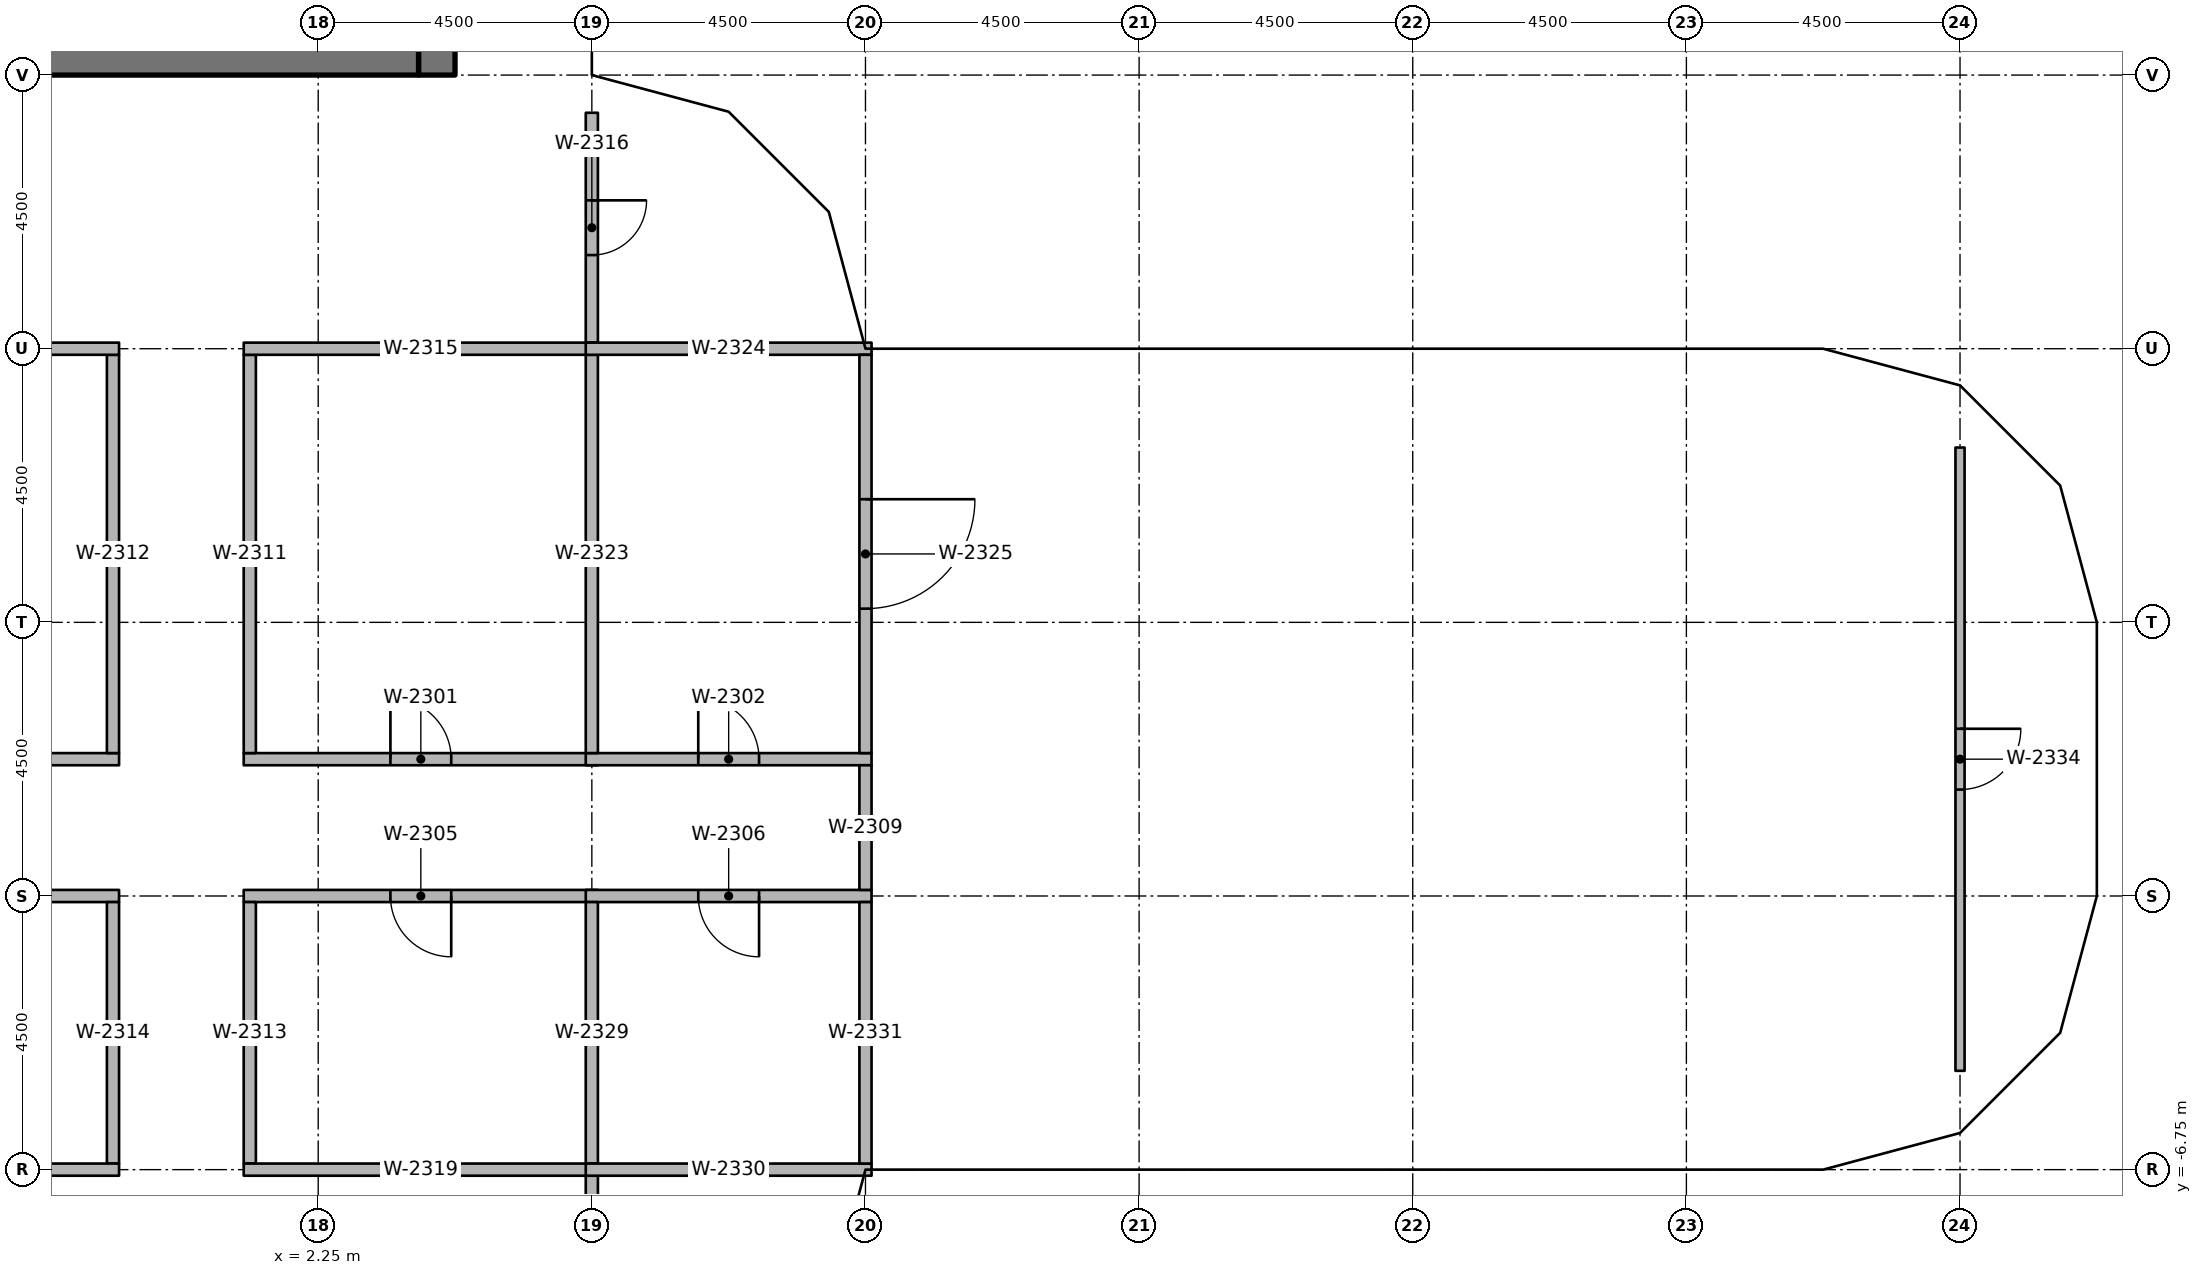
"""IFC4 building model, lengths in metres.
Left out: names, types, materials, properties, quantities, classifications, styles, units other than length and angle.
Written with IfcOpenShell. Run it as: python <this file> out.ifc"""

import sys

from ifc_helpers import new_model, si_unit, direction, frame, frame_2d, origin, origin_2d, place, context, subcontext, project, spatial, rectangle, extrude, element, fill, save


model = new_model("IFC4")
c1 = context("Model", 3, precision=1e-05, world=origin(), true_north=direction((0.0, 1.0)))
c2 = subcontext(c1, "Body", "Model", "MODEL_VIEW")
j1 = project(units=[si_unit("LENGTHUNIT", "METRE"), si_unit("PLANEANGLEUNIT", "RADIAN")], contexts=[c1])
p1 = place(None, origin())
s1 = spatial("IfcSite", under=j1, at=p1, CompositionType="ELEMENT")
p2 = place(p1, origin())
s2 = spatial("IfcBuilding", under=s1, at=p2, CompositionType="ELEMENT")
p3 = place(p2, frame((0.0, 0.0, 218.2)))
s3 = spatial("IfcBuildingStorey", under=s2, at=p3, CompositionType="ELEMENT", Elevation=218.2)
for number, where, z_axis, x_axis in (
    (1, (6.25, -6.25, 0.0), (0.0, 0.0, 1.0), (1.0, 0.0, 0.0)),
    (2, (6.25, 6.25, 0.0), (0.0, 0.0, 1.0), (1.0, 0.0, 0.0)),
    (3, (6.25, 10.75, 0.0), (0.0, 0.0, 1.0), (1.0, 0.0, 0.0)),
    (4, (10.75, -6.25, 0.0), (0.0, 0.0, 1.0), (1.0, 0.0, 0.0)),
    (5, (10.75, 6.25, 0.0), (0.0, 0.0, 1.0), (1.0, 0.0, 0.0)),
    (6, (15.75, -6.25, 0.0), (0.0, 0.0, 1.0), (1.0, 0.0, 0.0)),
    (7, (15.75, 6.25, 0.0), (0.0, 0.0, 1.0), (1.0, 0.0, 0.0)),
    (8, (20.25, -6.11, 0.0), (0.0, 0.0, 1.0), (1.0, 0.0, 0.0)),
    (9, (20.25, 6.11, 0.0), (0.0, 0.0, 1.0), (1.0, 0.0, 0.0)),
    (10, (24.75, -6.11, 0.0), (0.0, 0.0, 1.0), (1.0, 0.0, 0.0)),
    (11, (24.75, 6.11, 0.0), (0.0, 0.0, 1.0), (1.0, 0.0, 0.0)),
    (12, (28.908, -5.475, 0.0), (0.0, 0.0, 1.0), (1.0, 0.0, 0.0)),
    (13, (28.67, -2.25, 0.0), (0.0, 0.0, 1.0), (1.0, 0.0, 0.0)),
    (14, (28.67, 2.25, 0.0), (0.0, 0.0, 1.0), (1.0, 0.0, 0.0)),
    (15, (28.908, 5.475, 0.0), (0.0, 0.0, 1.0), (1.0, 0.0, 0.0)),
):
    element("IfcColumn", number, at=place(p3, frame(where, z_axis=z_axis, x_axis=x_axis)), inside=s3, PredefinedType="COLUMN", context=c2, shape_type="SweptSolid", body=[
        extrude(rectangle(XDim=0.7, YDim=0.7, at=origin_2d()), origin(), (0.0, 0.0, 1.0), 3.65),
    ])
p4 = place(p3, frame((4.2, 11.25, 0.0), z_axis=(0.0, 0.0, 1.0), x_axis=(0.0, 1.0, 0.0)))
e16 = element("IfcWall", 16, at=p4, inside=s3, PredefinedType="SHEAR", context=c2, shape_type="SweptSolid", body=[
    extrude(rectangle(XDim=15.0, YDim=0.6, at=frame_2d((7.5, 0.0))), origin(), (0.0, 0.0, 1.0), 3.8),
])
p5 = place(p4, frame((7.15, 0.0, 0.0)))
e17 = element("IfcOpeningElement", 17, at=p5, cuts=e16, PredefinedType="OPENING", context=c2, shape_type="SweptSolid", body=[
    extrude(rectangle(XDim=1.5, YDim=2.3, at=frame_2d((0.75, 1.15))), frame((0.0, 0.31, 0.0), z_axis=(0.0, -1.0, 0.0), x_axis=(1.0, 0.0, 0.0)), (0.0, 0.0, 1.0), 0.62),
])
p6 = place(p4, frame((5.55, 0.0, 0.0)))
e18 = element("IfcOpeningElement", 18, at=p6, cuts=e16, PredefinedType="OPENING", context=c2, shape_type="SweptSolid", body=[
    extrude(rectangle(XDim=1.2, YDim=2.1, at=frame_2d((0.6, 1.05))), frame((0.0, 0.31, 0.0), z_axis=(0.0, -1.0, 0.0), x_axis=(1.0, 0.0, 0.0)), (0.0, 0.0, 1.0), 0.62),
])
p7 = place(p3, frame((-3.9, 11.55, 0.0), z_axis=(0.0, 0.0, 1.0), x_axis=(1.0, 0.0, 0.0)))
e19 = element("IfcWall", 19, at=p7, inside=s3, PredefinedType="SHEAR", context=c2, shape_type="SweptSolid", body=[
    extrude(rectangle(XDim=7.8, YDim=0.6, at=frame_2d((3.9, 0.0))), origin(), (0.0, 0.0, 1.0), 3.8),
])
p8 = place(p3, frame((1.025, 0.0, 0.0), z_axis=(0.0, 0.0, 1.0), x_axis=(1.0, 0.0, 0.0)))
e20 = element("IfcWall", 20, at=p8, inside=s3, PredefinedType="PARTITIONING", context=c2, shape_type="SweptSolid", body=[
    extrude(rectangle(XDim=5.825, YDim=0.2, at=frame_2d((2.913, 0.0))), origin(), (0.0, 0.0, 1.0), 2.75),
])
p9 = place(p8, frame((2.413, 0.0, 0.0)))
e21 = element("IfcOpeningElement", 21, at=p9, cuts=e20, PredefinedType="OPENING", context=c2, shape_type="SweptSolid", body=[
    extrude(rectangle(XDim=1.0, YDim=2.1, at=frame_2d((0.5, 1.05))), frame((0.0, 0.11, 0.0), z_axis=(0.0, -1.0, 0.0), x_axis=(1.0, 0.0, 0.0)), (0.0, 0.0, 1.0), 0.22),
])
p10 = place(p3, frame((6.65, 0.0, 0.0), z_axis=(0.0, 0.0, 1.0), x_axis=(1.0, 0.0, 0.0)))
e22 = element("IfcWall", 22, at=p10, inside=s3, PredefinedType="PARTITIONING", context=c2, shape_type="SweptSolid", body=[
    extrude(rectangle(XDim=4.7, YDim=0.2, at=frame_2d((2.35, 0.0))), origin(), (0.0, 0.0, 1.0), 2.75),
])
p11 = place(p10, frame((1.85, 0.0, 0.0)))
e23 = element("IfcOpeningElement", 23, at=p11, cuts=e22, PredefinedType="OPENING", context=c2, shape_type="SweptSolid", body=[
    extrude(rectangle(XDim=1.0, YDim=2.1, at=frame_2d((0.5, 1.05))), frame((0.0, 0.11, 0.0), z_axis=(0.0, -1.0, 0.0), x_axis=(1.0, 0.0, 0.0)), (0.0, 0.0, 1.0), 0.22),
])
p12 = place(p3, frame((-6.85, 0.0, 0.0), z_axis=(0.0, 0.0, 1.0), x_axis=(1.0, 0.0, 0.0)))
e24 = element("IfcWall", 24, at=p12, inside=s3, PredefinedType="PARTITIONING", context=c2, shape_type="SweptSolid", body=[
    extrude(rectangle(XDim=5.825, YDim=0.2, at=frame_2d((2.913, 0.0))), origin(), (0.0, 0.0, 1.0), 2.75),
])
p13 = place(p12, frame((2.413, 0.0, 0.0)))
e25 = element("IfcOpeningElement", 25, at=p13, cuts=e24, PredefinedType="OPENING", context=c2, shape_type="SweptSolid", body=[
    extrude(rectangle(XDim=1.0, YDim=2.1, at=frame_2d((0.5, 1.05))), frame((0.0, 0.11, 0.0), z_axis=(0.0, -1.0, 0.0), x_axis=(1.0, 0.0, 0.0)), (0.0, 0.0, 1.0), 0.22),
])
p14 = place(p3, frame((6.85, -2.25, 0.0), z_axis=(0.0, 0.0, 1.0), x_axis=(-1.0, 0.0, 0.0)))
e26 = element("IfcWall", 26, at=p14, inside=s3, PredefinedType="PARTITIONING", context=c2, shape_type="SweptSolid", body=[
    extrude(rectangle(XDim=5.825, YDim=0.2, at=frame_2d((2.913, 0.0))), origin(), (0.0, 0.0, 1.0), 2.75),
])
p15 = place(p14, frame((2.413, 0.0, 0.0)))
e27 = element("IfcOpeningElement", 27, at=p15, cuts=e26, PredefinedType="OPENING", context=c2, shape_type="SweptSolid", body=[
    extrude(rectangle(XDim=1.0, YDim=2.1, at=frame_2d((0.5, 1.05))), frame((0.0, 0.11, 0.0), z_axis=(0.0, -1.0, 0.0), x_axis=(1.0, 0.0, 0.0)), (0.0, 0.0, 1.0), 0.22),
])
p16 = place(p3, frame((11.35, -2.25, 0.0), z_axis=(0.0, 0.0, 1.0), x_axis=(-1.0, 0.0, 0.0)))
e28 = element("IfcWall", 28, at=p16, inside=s3, PredefinedType="PARTITIONING", context=c2, shape_type="SweptSolid", body=[
    extrude(rectangle(XDim=4.7, YDim=0.2, at=frame_2d((2.35, 0.0))), origin(), (0.0, 0.0, 1.0), 2.75),
])
p17 = place(p16, frame((1.85, 0.0, 0.0)))
e29 = element("IfcOpeningElement", 29, at=p17, cuts=e28, PredefinedType="OPENING", context=c2, shape_type="SweptSolid", body=[
    extrude(rectangle(XDim=1.0, YDim=2.1, at=frame_2d((0.5, 1.05))), frame((0.0, 0.11, 0.0), z_axis=(0.0, -1.0, 0.0), x_axis=(1.0, 0.0, 0.0)), (0.0, 0.0, 1.0), 0.22),
])
p18 = place(p3, frame((-1.025, -2.25, 0.0), z_axis=(0.0, 0.0, 1.0), x_axis=(-1.0, 0.0, 0.0)))
e30 = element("IfcWall", 30, at=p18, inside=s3, PredefinedType="PARTITIONING", context=c2, shape_type="SweptSolid", body=[
    extrude(rectangle(XDim=5.825, YDim=0.2, at=frame_2d((2.913, 0.0))), origin(), (0.0, 0.0, 1.0), 2.75),
])
p19 = place(p18, frame((2.413, 0.0, 0.0)))
e31 = element("IfcOpeningElement", 31, at=p19, cuts=e30, PredefinedType="OPENING", context=c2, shape_type="SweptSolid", body=[
    extrude(rectangle(XDim=1.0, YDim=2.1, at=frame_2d((0.5, 1.05))), frame((0.0, 0.11, 0.0), z_axis=(0.0, -1.0, 0.0), x_axis=(1.0, 0.0, 0.0)), (0.0, 0.0, 1.0), 0.22),
])
p20 = place(p3, frame((11.25, -2.15, 0.0), z_axis=(0.0, 0.0, 1.0), x_axis=(0.0, 1.0, 0.0)))
e32 = element("IfcWall", 32, at=p20, inside=s3, PredefinedType="PARTITIONING", context=c2, shape_type="SweptSolid", body=[
    extrude(rectangle(XDim=2.05, YDim=0.2, at=frame_2d((1.025, 0.0))), origin(), (0.0, 0.0, 1.0), 2.75),
])
for number, where, z_axis, x_axis in (
    (33, (1.125, 0.1, 0.0), (0.0, 0.0, 1.0), (0.0, 1.0, 0.0)),
    (34, (-1.125, 0.1, 0.0), (0.0, 0.0, 1.0), (0.0, 1.0, 0.0)),
):
    element("IfcWall", number, at=place(p3, frame(where, z_axis=z_axis, x_axis=x_axis)), inside=s3, PredefinedType="PARTITIONING", context=c2, shape_type="SweptSolid", body=[
        extrude(rectangle(XDim=6.55, YDim=0.2, at=frame_2d((3.275, 0.0))), origin(), (0.0, 0.0, 1.0), 2.75),
    ])
for number, where, z_axis, x_axis in (
    (35, (1.125, -6.65, 0.0), (0.0, 0.0, 1.0), (0.0, 1.0, 0.0)),
    (36, (-1.125, -6.65, 0.0), (0.0, 0.0, 1.0), (0.0, 1.0, 0.0)),
):
    element("IfcWall", number, at=place(p3, frame(where, z_axis=z_axis, x_axis=x_axis)), inside=s3, PredefinedType="PARTITIONING", context=c2, shape_type="SweptSolid", body=[
        extrude(rectangle(XDim=4.3, YDim=0.2, at=frame_2d((2.15, 0.0))), origin(), (0.0, 0.0, 1.0), 2.75),
    ])
p21 = place(p3, frame((1.025, 6.75, 0.0), z_axis=(0.0, 0.0, 1.0), x_axis=(1.0, 0.0, 0.0)))
e37 = element("IfcWall", 37, at=p21, inside=s3, PredefinedType="PARTITIONING", context=c2, shape_type="SweptSolid", body=[
    extrude(rectangle(XDim=5.825, YDim=0.2, at=frame_2d((2.913, 0.0))), origin(), (0.0, 0.0, 1.0), 2.75),
])
p22 = place(p3, frame((6.75, 10.63, 0.0), z_axis=(0.0, 0.0, 1.0), x_axis=(0.0, -1.0, 0.0)))
e38 = element("IfcWall", 38, at=p22, inside=s3, PredefinedType="PARTITIONING", context=c2, shape_type="SweptSolid", body=[
    extrude(rectangle(XDim=3.78, YDim=0.2, at=frame_2d((1.89, 0.0))), origin(), (0.0, 0.0, 1.0), 2.75),
])
p23 = place(p22, frame((1.44, 0.0, 0.0)))
e39 = element("IfcOpeningElement", 39, at=p23, cuts=e38, PredefinedType="OPENING", context=c2, shape_type="SweptSolid", body=[
    extrude(rectangle(XDim=0.9, YDim=2.1, at=frame_2d((0.45, 1.05))), frame((0.0, 0.11, 0.0), z_axis=(0.0, -1.0, 0.0), x_axis=(1.0, 0.0, 0.0)), (0.0, 0.0, 1.0), 0.22),
])
for number, where, z_axis, x_axis in (
    (40, (-6.85, 6.75, 0.0), (0.0, 0.0, 1.0), (1.0, 0.0, 0.0)),
    (41, (1.025, -6.75, 0.0), (0.0, 0.0, 1.0), (1.0, 0.0, 0.0)),
):
    element("IfcWall", number, at=place(p3, frame(where, z_axis=z_axis, x_axis=x_axis)), inside=s3, PredefinedType="PARTITIONING", context=c2, shape_type="SweptSolid", body=[
        extrude(rectangle(XDim=5.825, YDim=0.2, at=frame_2d((2.913, 0.0))), origin(), (0.0, 0.0, 1.0), 2.75),
    ])
p24 = place(p3, frame((6.75, -6.85, 0.0), z_axis=(0.0, 0.0, 1.0), x_axis=(0.0, -1.0, 0.0)))
e42 = element("IfcWall", 42, at=p24, inside=s3, PredefinedType="PARTITIONING", context=c2, shape_type="SweptSolid", body=[
    extrude(rectangle(XDim=3.78, YDim=0.2, at=frame_2d((1.89, 0.0))), origin(), (0.0, 0.0, 1.0), 2.75),
])
p25 = place(p24, frame((1.44, 0.0, 0.0)))
e43 = element("IfcOpeningElement", 43, at=p25, cuts=e42, PredefinedType="OPENING", context=c2, shape_type="SweptSolid", body=[
    extrude(rectangle(XDim=0.9, YDim=2.1, at=frame_2d((0.45, 1.05))), frame((0.0, 0.11, 0.0), z_axis=(0.0, -1.0, 0.0), x_axis=(1.0, 0.0, 0.0)), (0.0, 0.0, 1.0), 0.22),
])
p26 = place(p3, frame((-6.85, -6.75, 0.0), z_axis=(0.0, 0.0, 1.0), x_axis=(1.0, 0.0, 0.0)))
e44 = element("IfcWall", 44, at=p26, inside=s3, PredefinedType="PARTITIONING", context=c2, shape_type="SweptSolid", body=[
    extrude(rectangle(XDim=5.825, YDim=0.2, at=frame_2d((2.913, 0.0))), origin(), (0.0, 0.0, 1.0), 2.75),
])
p27 = place(p3, frame((6.75, 0.1, 0.0), z_axis=(0.0, 0.0, 1.0), x_axis=(0.0, 1.0, 0.0)))
e45 = element("IfcWall", 45, at=p27, inside=s3, PredefinedType="PARTITIONING", context=c2, shape_type="SweptSolid", body=[
    extrude(rectangle(XDim=6.55, YDim=0.2, at=frame_2d((3.275, 0.0))), origin(), (0.0, 0.0, 1.0), 2.75),
])
p28 = place(p3, frame((6.65, 6.75, 0.0), z_axis=(0.0, 0.0, 1.0), x_axis=(1.0, 0.0, 0.0)))
e46 = element("IfcWall", 46, at=p28, inside=s3, PredefinedType="PARTITIONING", context=c2, shape_type="SweptSolid", body=[
    extrude(rectangle(XDim=4.7, YDim=0.2, at=frame_2d((2.35, 0.0))), origin(), (0.0, 0.0, 1.0), 2.75),
])
p29 = place(p3, frame((11.25, 6.65, 0.0), z_axis=(0.0, 0.0, 1.0), x_axis=(0.0, -1.0, 0.0)))
e47 = element("IfcWall", 47, at=p29, inside=s3, PredefinedType="PARTITIONING", context=c2, shape_type="SweptSolid", body=[
    extrude(rectangle(XDim=6.55, YDim=0.2, at=frame_2d((3.275, 0.0))), origin(), (0.0, 0.0, 1.0), 2.75),
])
p30 = place(p29, frame((2.375, 0.0, 0.0)))
e48 = element("IfcOpeningElement", 48, at=p30, cuts=e47, PredefinedType="OPENING", context=c2, shape_type="SweptSolid", body=[
    extrude(rectangle(XDim=1.8, YDim=2.1, at=frame_2d((0.9, 1.05))), frame((0.0, 0.11, 0.0), z_axis=(0.0, -1.0, 0.0), x_axis=(1.0, 0.0, 0.0)), (0.0, 0.0, 1.0), 0.22),
])
p31 = place(p3, frame((6.75, -6.65, 0.0), z_axis=(0.0, 0.0, 1.0), x_axis=(0.0, 1.0, 0.0)))
e49 = element("IfcWall", 49, at=p31, inside=s3, PredefinedType="PARTITIONING", context=c2, shape_type="SweptSolid", body=[
    extrude(rectangle(XDim=4.3, YDim=0.2, at=frame_2d((2.15, 0.0))), origin(), (0.0, 0.0, 1.0), 2.75),
])
p32 = place(p3, frame((6.65, -6.75, 0.0), z_axis=(0.0, 0.0, 1.0), x_axis=(1.0, 0.0, 0.0)))
e50 = element("IfcWall", 50, at=p32, inside=s3, PredefinedType="PARTITIONING", context=c2, shape_type="SweptSolid", body=[
    extrude(rectangle(XDim=4.7, YDim=0.2, at=frame_2d((2.35, 0.0))), origin(), (0.0, 0.0, 1.0), 2.75),
])
p33 = place(p3, frame((11.25, -6.65, 0.0), z_axis=(0.0, 0.0, 1.0), x_axis=(0.0, 1.0, 0.0)))
e51 = element("IfcWall", 51, at=p33, inside=s3, PredefinedType="PARTITIONING", context=c2, shape_type="SweptSolid", body=[
    extrude(rectangle(XDim=4.3, YDim=0.2, at=frame_2d((2.15, 0.0))), origin(), (0.0, 0.0, 1.0), 2.75),
])
p34 = place(p3, frame((29.25, 5.125, 0.0), z_axis=(0.0, 0.0, 1.0), x_axis=(0.0, -1.0, 0.0)))
e52 = element("IfcWall", 52, at=p34, inside=s3, PredefinedType="PARTITIONING", context=c2, shape_type="SweptSolid", body=[
    extrude(rectangle(XDim=10.25, YDim=0.15, at=frame_2d((5.125, 0.0))), origin(), (0.0, 0.0, 1.0), 2.75),
])
p35 = place(p34, frame((4.625, 0.0, 0.0)))
e53 = element("IfcOpeningElement", 53, at=p35, cuts=e52, PredefinedType="OPENING", context=c2, shape_type="SweptSolid", body=[
    extrude(rectangle(XDim=1.0, YDim=2.1, at=frame_2d((0.5, 1.05))), frame((0.0, 0.085, 0.0), z_axis=(0.0, -1.0, 0.0), x_axis=(1.0, 0.0, 0.0)), (0.0, 0.0, 1.0), 0.17),
])
p36 = place(p35, origin())
e54 = element("IfcDoor", 54, at=p36, inside=s3, OperationType="SINGLE_SWING_RIGHT", PredefinedType="DOOR", context=c2, shape_type="SweptSolid", body=[
    extrude(rectangle(XDim=1.0, YDim=2.1, at=frame_2d((0.5, 1.05))), frame((0.0, 0.025, 0.0), z_axis=(0.0, -1.0, 0.0), x_axis=(1.0, 0.0, 0.0)), (0.0, 0.0, 1.0), 0.05),
])
fill(e53, e54)
p37 = place(p30, origin())
e55 = element("IfcDoor", 55, at=p37, inside=s3, OperationType="DOUBLE_DOOR_SINGLE_SWING", PredefinedType="DOOR", context=c2, shape_type="SweptSolid", body=[
    extrude(rectangle(XDim=1.8, YDim=2.1, at=frame_2d((0.9, 1.05))), frame((0.0, 0.025, 0.0), z_axis=(0.0, -1.0, 0.0), x_axis=(1.0, 0.0, 0.0)), (0.0, 0.0, 1.0), 0.05),
])
fill(e48, e55)
p38 = place(p9, origin())
e56 = element("IfcDoor", 56, at=p38, inside=s3, OperationType="SINGLE_SWING_RIGHT", PredefinedType="DOOR", context=c2, shape_type="SweptSolid", body=[
    extrude(rectangle(XDim=1.0, YDim=2.1, at=frame_2d((0.5, 1.05))), frame((0.0, 0.025, 0.0), z_axis=(0.0, -1.0, 0.0), x_axis=(1.0, 0.0, 0.0)), (0.0, 0.0, 1.0), 0.05),
])
fill(e21, e56)
p39 = place(p11, origin())
e57 = element("IfcDoor", 57, at=p39, inside=s3, OperationType="SINGLE_SWING_RIGHT", PredefinedType="DOOR", context=c2, shape_type="SweptSolid", body=[
    extrude(rectangle(XDim=1.0, YDim=2.1, at=frame_2d((0.5, 1.05))), frame((0.0, 0.025, 0.0), z_axis=(0.0, -1.0, 0.0), x_axis=(1.0, 0.0, 0.0)), (0.0, 0.0, 1.0), 0.05),
])
fill(e23, e57)
p40 = place(p23, origin())
e58 = element("IfcDoor", 58, at=p40, inside=s3, OperationType="SINGLE_SWING_RIGHT", PredefinedType="DOOR", context=c2, shape_type="SweptSolid", body=[
    extrude(rectangle(XDim=0.9, YDim=2.1, at=frame_2d((0.45, 1.05))), frame((0.0, 0.025, 0.0), z_axis=(0.0, -1.0, 0.0), x_axis=(1.0, 0.0, 0.0)), (0.0, 0.0, 1.0), 0.05),
])
fill(e39, e58)
p41 = place(p15, origin())
e59 = element("IfcDoor", 59, at=p41, inside=s3, OperationType="SINGLE_SWING_RIGHT", PredefinedType="DOOR", context=c2, shape_type="SweptSolid", body=[
    extrude(rectangle(XDim=1.0, YDim=2.1, at=frame_2d((0.5, 1.05))), frame((0.0, 0.025, 0.0), z_axis=(0.0, -1.0, 0.0), x_axis=(1.0, 0.0, 0.0)), (0.0, 0.0, 1.0), 0.05),
])
fill(e27, e59)
p42 = place(p17, origin())
e60 = element("IfcDoor", 60, at=p42, inside=s3, OperationType="SINGLE_SWING_RIGHT", PredefinedType="DOOR", context=c2, shape_type="SweptSolid", body=[
    extrude(rectangle(XDim=1.0, YDim=2.1, at=frame_2d((0.5, 1.05))), frame((0.0, 0.025, 0.0), z_axis=(0.0, -1.0, 0.0), x_axis=(1.0, 0.0, 0.0)), (0.0, 0.0, 1.0), 0.05),
])
fill(e29, e60)
save(model, sys.argv[1])
